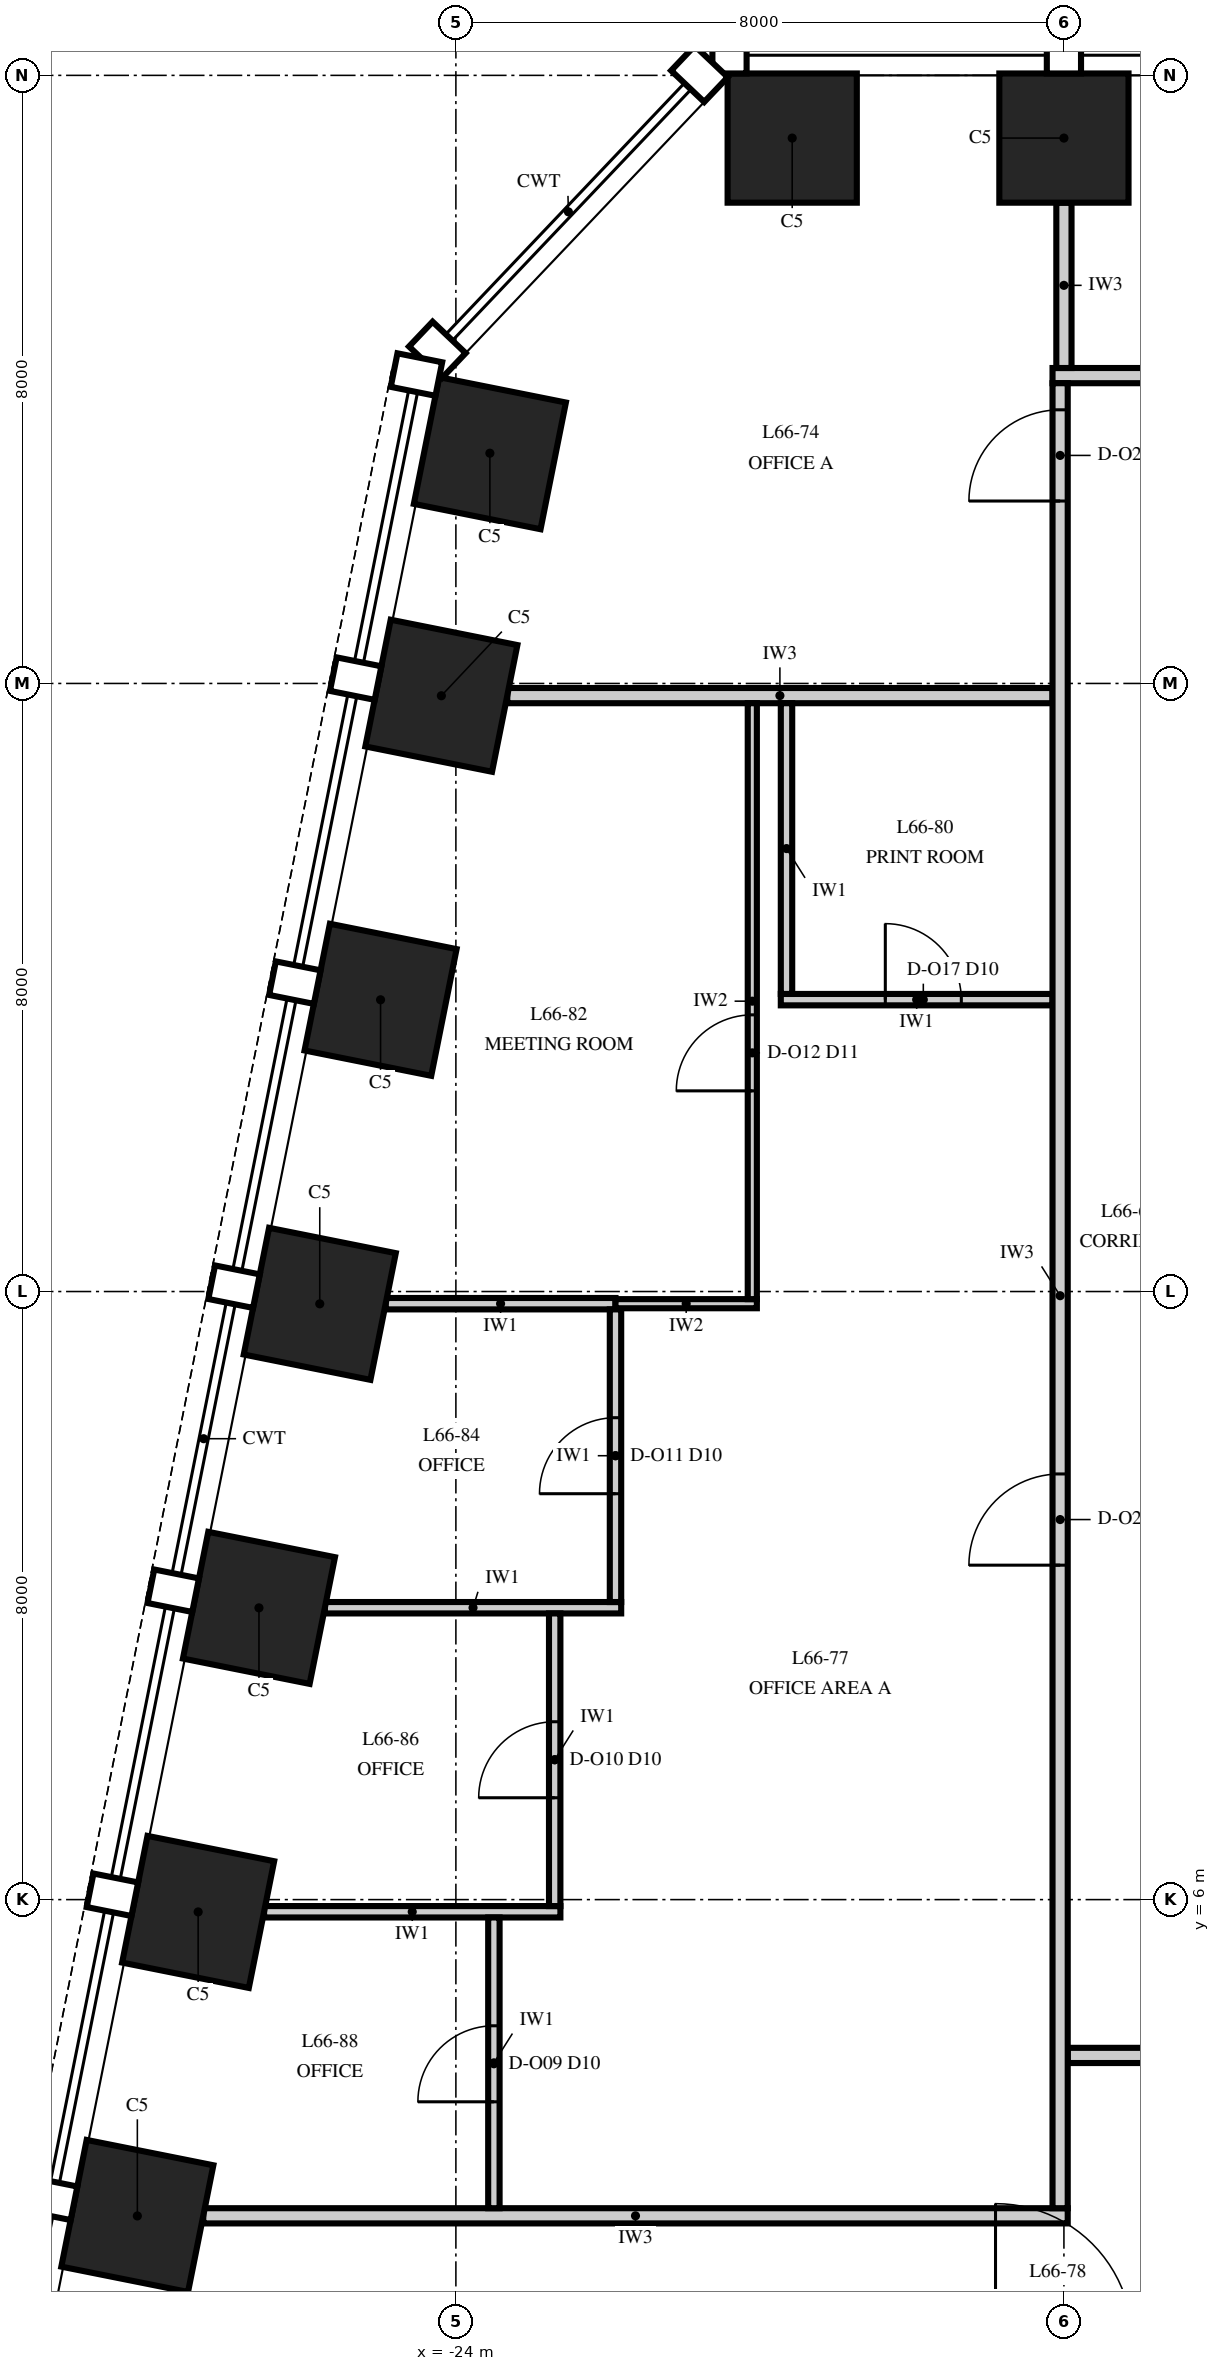
"""IFC4 building model, lengths in metres.
Left out: names, types, materials, properties, quantities, classifications, styles, units other than length and angle.
Written with IfcOpenShell. Run it as: python <this file> out.ifc"""

import sys

from ifc_helpers import new_model, si_unit, direction, frame, frame_2d, origin, origin_2d, place, context, subcontext, project, spatial, rectangle, extrude, element, fill, save


model = new_model("IFC4")
c1 = context("Model", 3, precision=1e-05, world=origin(), true_north=direction((0.0, 1.0)))
c2 = subcontext(c1, "Body", "Model", "MODEL_VIEW")
j1 = project(units=[si_unit("LENGTHUNIT", "METRE"), si_unit("PLANEANGLEUNIT", "RADIAN")], contexts=[c1])
p1 = place(None, origin())
s1 = spatial("IfcSite", under=j1, at=p1, CompositionType="ELEMENT")
p2 = place(p1, origin())
s2 = spatial("IfcBuilding", under=s1, at=p2, CompositionType="ELEMENT")
p3 = place(p2, frame((0.0, 0.0, 284.0)))
s3 = spatial("IfcBuildingStorey", under=s2, at=p3, CompositionType="ELEMENT", Elevation=284.0)
for number, where, z_axis, x_axis in (
    (1, (-16.0, 29.175, 0.0), (0.0, 0.0, 1.0), (-1.0, 0.0, 0.0)),
    (2, (-19.575, 29.175, 0.0), (0.0, 0.0, 1.0), (-1.0, 0.0, 0.0)),
    (3, (-23.553, 25.029, 0.0), (0.0, 0.0, 1.0), (-0.196, -0.981, 0.0)),
    (4, (-24.191, 21.838, 0.0), (0.0, 0.0, 1.0), (-0.196, -0.981, 0.0)),
    (5, (-24.991, 17.838, 0.0), (0.0, 0.0, 1.0), (-0.196, -0.981, 0.0)),
    (6, (-25.791, 13.838, 0.0), (0.0, 0.0, 1.0), (-0.196, -0.981, 0.0)),
    (7, (-26.591, 9.838, 0.0), (0.0, 0.0, 1.0), (-0.196, -0.981, 0.0)),
    (8, (-27.391, 5.838, 0.0), (0.0, 0.0, 1.0), (-0.196, -0.981, 0.0)),
    (9, (-28.191, 1.838, 0.0), (0.0, 0.0, 1.0), (-0.196, -0.981, 0.0)),
):
    element("IfcColumn", number, at=place(p3, frame(where, z_axis=z_axis, x_axis=x_axis)), inside=s3, PredefinedType="COLUMN", context=c2, shape_type="SweptSolid", body=[
        extrude(rectangle(XDim=1.7, YDim=1.7, at=origin_2d()), origin(), (0.0, 0.0, 1.0), 4.0),
    ])
p4 = place(p3, frame((-27.324, 1.84, 0.0), z_axis=(0.0, 0.0, 1.0), x_axis=(1.0, 0.0, 0.0)))
e10 = element("IfcWall", 10, at=p4, inside=s3, PredefinedType="PARTITIONING", context=c2, shape_type="SweptSolid", body=[
    extrude(rectangle(XDim=11.374, YDim=0.2, at=frame_2d((5.687, 0.0))), origin(), (0.0, 0.0, 1.0), 3.23),
])
p5 = place(p3, frame((-15.95, 3.95, 0.0), z_axis=(0.0, 0.0, 1.0), x_axis=(1.0, 0.0, 0.0)))
e11 = element("IfcWall", 11, at=p5, inside=s3, PredefinedType="PARTITIONING", context=c2, shape_type="SweptSolid", body=[
    extrude(rectangle(XDim=14.05, YDim=0.2, at=frame_2d((7.025, 0.0))), origin(), (0.0, 0.0, 1.0), 3.23),
])
p6 = place(p5, frame((9.35, 0.0, 0.0)))
e12 = element("IfcOpeningElement", 12, at=p6, cuts=e11, PredefinedType="OPENING", context=c2, shape_type="SweptSolid", body=[
    extrude(rectangle(XDim=1.2, YDim=2.4, at=frame_2d((0.6, 1.2))), frame((0.0, 0.115, 0.0), z_axis=(0.0, -1.0, 0.0), x_axis=(1.0, 0.0, 0.0)), (0.0, 0.0, 1.0), 0.23),
])
p7 = place(p3, frame((-26.524, 5.84, 0.0), z_axis=(0.0, 0.0, 1.0), x_axis=(1.0, 0.0, 0.0)))
e13 = element("IfcWall", 13, at=p7, inside=s3, PredefinedType="PARTITIONING", context=c2, shape_type="SweptSolid", body=[
    extrude(rectangle(XDim=3.899, YDim=0.15, at=frame_2d((1.949, 0.0))), origin(), (0.0, 0.0, 1.0), 2.842),
])
p8 = place(p3, frame((-25.724, 9.84, 0.0), z_axis=(0.0, 0.0, 1.0), x_axis=(1.0, 0.0, 0.0)))
e14 = element("IfcWall", 14, at=p8, inside=s3, PredefinedType="PARTITIONING", context=c2, shape_type="SweptSolid", body=[
    extrude(rectangle(XDim=3.899, YDim=0.15, at=frame_2d((1.949, 0.0))), origin(), (0.0, 0.0, 1.0), 3.23),
])
p9 = place(p3, frame((-24.924, 13.84, 0.0), z_axis=(0.0, 0.0, 1.0), x_axis=(1.0, 0.0, 0.0)))
e15 = element("IfcWall", 15, at=p9, inside=s3, PredefinedType="PARTITIONING", context=c2, shape_type="SweptSolid", body=[
    extrude(rectangle(XDim=3.024, YDim=0.15, at=frame_2d((1.512, 0.0))), origin(), (0.0, 0.0, 1.0), 3.23),
])
p10 = place(p3, frame((-21.9, 13.84, 0.0), z_axis=(0.0, 0.0, 1.0), x_axis=(1.0, 0.0, 0.0)))
e16 = element("IfcWall", 16, at=p10, inside=s3, PredefinedType="PARTITIONING", context=c2, shape_type="SweptSolid", body=[
    extrude(rectangle(XDim=1.86, YDim=0.12, at=frame_2d((0.93, 0.0))), origin(), (0.0, 0.0, 1.0), 3.85),
])
p11 = place(p3, frame((-19.725, 17.84, 0.0), z_axis=(0.0, 0.0, 1.0), x_axis=(1.0, 0.0, 0.0)))
e17 = element("IfcWall", 17, at=p11, inside=s3, PredefinedType="PARTITIONING", context=c2, shape_type="SweptSolid", body=[
    extrude(rectangle(XDim=3.575, YDim=0.15, at=frame_2d((1.788, 0.0))), origin(), (0.0, 0.0, 1.0), 3.23),
])
p12 = place(p11, frame((1.375, 0.0, 0.0)))
e18 = element("IfcOpeningElement", 18, at=p12, cuts=e17, PredefinedType="OPENING", context=c2, shape_type="SweptSolid", body=[
    extrude(rectangle(XDim=1.0, YDim=2.3, at=frame_2d((0.5, 1.15))), frame((0.0, 0.09, 0.0), z_axis=(0.0, -1.0, 0.0), x_axis=(1.0, 0.0, 0.0)), (0.0, 0.0, 1.0), 0.18),
])
p13 = place(p3, frame((-23.324, 21.84, 0.0), z_axis=(0.0, 0.0, 1.0), x_axis=(1.0, 0.0, 0.0)))
e19 = element("IfcWall", 19, at=p13, inside=s3, PredefinedType="PARTITIONING", context=c2, shape_type="SweptSolid", body=[
    extrude(rectangle(XDim=7.174, YDim=0.2, at=frame_2d((3.587, 0.0))), origin(), (0.0, 0.0, 1.0), 3.23),
])
p14 = place(p3, frame((-16.15, 26.05, 0.0), z_axis=(0.0, 0.0, 1.0), x_axis=(1.0, 0.0, 0.0)))
e20 = element("IfcWall", 20, at=p14, inside=s3, PredefinedType="PARTITIONING", context=c2, shape_type="SweptSolid", body=[
    extrude(rectangle(XDim=32.3, YDim=0.2, at=frame_2d((16.15, 0.0))), origin(), (0.0, 0.0, 1.0), 3.418),
])
p15 = place(p14, frame((1.55, 0.0, 0.0)))
e21 = element("IfcOpeningElement", 21, at=p15, cuts=e20, PredefinedType="OPENING", context=c2, shape_type="SweptSolid", body=[
    extrude(rectangle(XDim=1.2, YDim=2.4, at=frame_2d((0.6, 1.2))), frame((0.0, 0.115, 0.0), z_axis=(0.0, -1.0, 0.0), x_axis=(1.0, 0.0, 0.0)), (0.0, 0.0, 1.0), 0.23),
])
p16 = place(p14, frame((7.55, 0.0, 0.0)))
e22 = element("IfcOpeningElement", 22, at=p16, cuts=e20, PredefinedType="OPENING", context=c2, shape_type="SweptSolid", body=[
    extrude(rectangle(XDim=1.2, YDim=2.4, at=frame_2d((0.6, 1.2))), frame((0.0, 0.115, 0.0), z_axis=(0.0, -1.0, 0.0), x_axis=(1.0, 0.0, 0.0)), (0.0, 0.0, 1.0), 0.23),
])
p17 = place(p14, frame((13.55, 0.0, 0.0)))
e23 = element("IfcOpeningElement", 23, at=p17, cuts=e20, PredefinedType="OPENING", context=c2, shape_type="SweptSolid", body=[
    extrude(rectangle(XDim=1.2, YDim=2.4, at=frame_2d((0.6, 1.2))), frame((0.0, 0.115, 0.0), z_axis=(0.0, -1.0, 0.0), x_axis=(1.0, 0.0, 0.0)), (0.0, 0.0, 1.0), 0.23),
])
p18 = place(p14, frame((17.55, 0.0, 0.0)))
e24 = element("IfcOpeningElement", 24, at=p18, cuts=e20, PredefinedType="OPENING", context=c2, shape_type="SweptSolid", body=[
    extrude(rectangle(XDim=1.2, YDim=2.4, at=frame_2d((0.6, 1.2))), frame((0.0, 0.115, 0.0), z_axis=(0.0, -1.0, 0.0), x_axis=(1.0, 0.0, 0.0)), (0.0, 0.0, 1.0), 0.23),
])
p19 = place(p14, frame((23.55, 0.0, 0.0)))
e25 = element("IfcOpeningElement", 25, at=p19, cuts=e20, PredefinedType="OPENING", context=c2, shape_type="SweptSolid", body=[
    extrude(rectangle(XDim=1.2, YDim=2.4, at=frame_2d((0.6, 1.2))), frame((0.0, 0.115, 0.0), z_axis=(0.0, -1.0, 0.0), x_axis=(1.0, 0.0, 0.0)), (0.0, 0.0, 1.0), 0.23),
])
p20 = place(p14, frame((29.55, 0.0, 0.0)))
e26 = element("IfcOpeningElement", 26, at=p20, cuts=e20, PredefinedType="OPENING", context=c2, shape_type="SweptSolid", body=[
    extrude(rectangle(XDim=1.2, YDim=2.4, at=frame_2d((0.6, 1.2))), frame((0.0, 0.115, 0.0), z_axis=(0.0, -1.0, 0.0), x_axis=(1.0, 0.0, 0.0)), (0.0, 0.0, 1.0), 0.23),
])
p21 = place(p3, frame((-23.5, 1.94, 0.0), z_axis=(0.0, 0.0, 1.0), x_axis=(0.0, 1.0, 0.0)))
e27 = element("IfcWall", 27, at=p21, inside=s3, PredefinedType="PARTITIONING", context=c2, shape_type="SweptSolid", body=[
    extrude(rectangle(XDim=3.825, YDim=0.15, at=frame_2d((1.913, 0.0))), origin(), (0.0, 0.0, 1.0), 3.85),
])
p22 = place(p21, frame((1.4, 0.0, 0.0)))
e28 = element("IfcOpeningElement", 28, at=p22, cuts=e27, PredefinedType="OPENING", context=c2, shape_type="SweptSolid", body=[
    extrude(rectangle(XDim=1.0, YDim=2.3, at=frame_2d((0.5, 1.15))), frame((0.0, 0.09, 0.0), z_axis=(0.0, -1.0, 0.0), x_axis=(1.0, 0.0, 0.0)), (0.0, 0.0, 1.0), 0.18),
])
p23 = place(p3, frame((-22.7, 5.915, 0.0), z_axis=(0.0, 0.0, 1.0), x_axis=(0.0, 1.0, 0.0)))
e29 = element("IfcWall", 29, at=p23, inside=s3, PredefinedType="PARTITIONING", context=c2, shape_type="SweptSolid", body=[
    extrude(rectangle(XDim=3.85, YDim=0.15, at=frame_2d((1.925, 0.0))), origin(), (0.0, 0.0, 1.0), 2.842),
])
p24 = place(p23, frame((1.425, 0.0, 0.0)))
e30 = element("IfcOpeningElement", 30, at=p24, cuts=e29, PredefinedType="OPENING", context=c2, shape_type="SweptSolid", body=[
    extrude(rectangle(XDim=1.0, YDim=2.3, at=frame_2d((0.5, 1.15))), frame((0.0, 0.09, 0.0), z_axis=(0.0, -1.0, 0.0), x_axis=(1.0, 0.0, 0.0)), (0.0, 0.0, 1.0), 0.18),
])
p25 = place(p3, frame((-21.9, 9.915, 0.0), z_axis=(0.0, 0.0, 1.0), x_axis=(0.0, 1.0, 0.0)))
e31 = element("IfcWall", 31, at=p25, inside=s3, PredefinedType="PARTITIONING", context=c2, shape_type="SweptSolid", body=[
    extrude(rectangle(XDim=3.85, YDim=0.15, at=frame_2d((1.925, 0.0))), origin(), (0.0, 0.0, 1.0), 3.85),
])
p26 = place(p25, frame((1.425, 0.0, 0.0)))
e32 = element("IfcOpeningElement", 32, at=p26, cuts=e31, PredefinedType="OPENING", context=c2, shape_type="SweptSolid", body=[
    extrude(rectangle(XDim=1.0, YDim=2.3, at=frame_2d((0.5, 1.15))), frame((0.0, 0.09, 0.0), z_axis=(0.0, -1.0, 0.0), x_axis=(1.0, 0.0, 0.0)), (0.0, 0.0, 1.0), 0.18),
])
p27 = place(p3, frame((-20.1, 13.9, 0.0), z_axis=(0.0, 0.0, 1.0), x_axis=(0.0, 1.0, 0.0)))
e33 = element("IfcWall", 33, at=p27, inside=s3, PredefinedType="PARTITIONING", context=c2, shape_type="SweptSolid", body=[
    extrude(rectangle(XDim=7.84, YDim=0.12, at=frame_2d((3.92, 0.0))), origin(), (0.0, 0.0, 1.0), 3.23),
])
p28 = place(p27, frame((2.74, 0.0, 0.0)))
e34 = element("IfcOpeningElement", 34, at=p28, cuts=e33, PredefinedType="OPENING", context=c2, shape_type="SweptSolid", body=[
    extrude(rectangle(XDim=1.0, YDim=2.4, at=frame_2d((0.5, 1.2))), frame((0.0, 0.075, 0.0), z_axis=(0.0, -1.0, 0.0), x_axis=(1.0, 0.0, 0.0)), (0.0, 0.0, 1.0), 0.15),
])
p29 = place(p3, frame((-19.65, 17.915, 0.0), z_axis=(0.0, 0.0, 1.0), x_axis=(0.0, 1.0, 0.0)))
e35 = element("IfcWall", 35, at=p29, inside=s3, PredefinedType="PARTITIONING", context=c2, shape_type="SweptSolid", body=[
    extrude(rectangle(XDim=3.825, YDim=0.15, at=frame_2d((1.913, 0.0))), origin(), (0.0, 0.0, 1.0), 3.23),
])
p30 = place(p3, frame((-16.05, 1.94, 0.0), z_axis=(0.0, 0.0, 1.0), x_axis=(0.0, 1.0, 0.0)))
e36 = element("IfcWall", 36, at=p30, inside=s3, PredefinedType="PARTITIONING", context=c2, shape_type="SweptSolid", body=[
    extrude(rectangle(XDim=24.01, YDim=0.2, at=frame_2d((12.005, 0.0))), origin(), (0.0, 0.0, 1.0), 2.842),
])
p31 = place(p30, frame((8.46, 0.0, 0.0)))
e37 = element("IfcOpeningElement", 37, at=p31, cuts=e36, PredefinedType="OPENING", context=c2, shape_type="SweptSolid", body=[
    extrude(rectangle(XDim=1.2, YDim=2.4, at=frame_2d((0.6, 1.2))), frame((0.0, 0.115, 0.0), z_axis=(0.0, -1.0, 0.0), x_axis=(1.0, 0.0, 0.0)), (0.0, 0.0, 1.0), 0.23),
])
p32 = place(p30, frame((22.46, 0.0, 0.0)))
e38 = element("IfcOpeningElement", 38, at=p32, cuts=e36, PredefinedType="OPENING", context=c2, shape_type="SweptSolid", body=[
    extrude(rectangle(XDim=1.2, YDim=2.4, at=frame_2d((0.6, 1.2))), frame((0.0, 0.115, 0.0), z_axis=(0.0, -1.0, 0.0), x_axis=(1.0, 0.0, 0.0)), (0.0, 0.0, 1.0), 0.23),
])
p33 = place(p3, frame((-16.0, 26.15, 0.0), z_axis=(0.0, 0.0, 1.0), x_axis=(0.0, 1.0, 0.0)))
e39 = element("IfcWall", 39, at=p33, inside=s3, PredefinedType="PARTITIONING", context=c2, shape_type="SweptSolid", body=[
    extrude(rectangle(XDim=2.175, YDim=0.2, at=frame_2d((1.087, 0.0))), origin(), (0.0, 0.0, 1.0), 3.418),
])
p34 = place(p22, origin())
e40 = element("IfcDoor", 40, at=p34, inside=s3, OperationType="SINGLE_SWING_LEFT", PredefinedType="DOOR", context=c2, shape_type="SweptSolid", body=[
    extrude(rectangle(XDim=1.0, YDim=2.3, at=frame_2d((0.5, 1.15))), frame((0.0, 0.075, 0.0), z_axis=(0.0, -1.0, 0.0), x_axis=(1.0, 0.0, 0.0)), (0.0, 0.0, 1.0), 0.149),
])
fill(e28, e40)
p35 = place(p24, origin())
e41 = element("IfcDoor", 41, at=p35, inside=s3, OperationType="SINGLE_SWING_LEFT", PredefinedType="DOOR", context=c2, shape_type="SweptSolid", body=[
    extrude(rectangle(XDim=1.0, YDim=2.3, at=frame_2d((0.5, 1.15))), frame((0.0, 0.075, 0.0), z_axis=(0.0, -1.0, 0.0), x_axis=(1.0, 0.0, 0.0)), (0.0, 0.0, 1.0), 0.149),
])
fill(e30, e41)
p36 = place(p26, origin())
e42 = element("IfcDoor", 42, at=p36, inside=s3, OperationType="SINGLE_SWING_LEFT", PredefinedType="DOOR", context=c2, shape_type="SweptSolid", body=[
    extrude(rectangle(XDim=1.0, YDim=2.3, at=frame_2d((0.5, 1.15))), frame((0.0, 0.075, 0.0), z_axis=(0.0, -1.0, 0.0), x_axis=(1.0, 0.0, 0.0)), (0.0, 0.0, 1.0), 0.149),
])
fill(e32, e42)
p37 = place(p28, origin())
e43 = element("IfcDoor", 43, at=p37, inside=s3, OperationType="SINGLE_SWING_RIGHT", PredefinedType="DOOR", context=c2, shape_type="SweptSolid", body=[
    extrude(rectangle(XDim=1.0, YDim=2.4, at=frame_2d((0.5, 1.2))), frame((0.0, 0.06, 0.0), z_axis=(0.0, -1.0, 0.0), x_axis=(1.0, 0.0, 0.0)), (0.0, 0.0, 1.0), 0.12),
])
fill(e34, e43)
p38 = place(p12, origin())
e44 = element("IfcDoor", 44, at=p38, inside=s3, OperationType="SINGLE_SWING_LEFT", PredefinedType="DOOR", context=c2, shape_type="SweptSolid", body=[
    extrude(rectangle(XDim=1.0, YDim=2.3, at=frame_2d((0.5, 1.15))), frame((0.0, 0.075, 0.0), z_axis=(0.0, -1.0, 0.0), x_axis=(1.0, 0.0, 0.0)), (0.0, 0.0, 1.0), 0.149),
])
fill(e18, e44)
p39 = place(p31, origin())
e45 = element("IfcDoor", 45, at=p39, inside=s3, OperationType="SINGLE_SWING_LEFT", PredefinedType="DOOR", context=c2, shape_type="SweptSolid", body=[
    extrude(rectangle(XDim=1.2, YDim=2.4, at=frame_2d((0.6, 1.2))), frame((0.0, 0.1, 0.0), z_axis=(0.0, -1.0, 0.0), x_axis=(1.0, 0.0, 0.0)), (0.0, 0.0, 1.0), 0.199),
])
fill(e37, e45)
p40 = place(p32, origin())
e46 = element("IfcDoor", 46, at=p40, inside=s3, OperationType="SINGLE_SWING_LEFT", PredefinedType="DOOR", context=c2, shape_type="SweptSolid", body=[
    extrude(rectangle(XDim=1.2, YDim=2.4, at=frame_2d((0.6, 1.2))), frame((0.0, 0.1, 0.0), z_axis=(0.0, -1.0, 0.0), x_axis=(1.0, 0.0, 0.0)), (0.0, 0.0, 1.0), 0.199),
])
fill(e38, e46)
save(model, sys.argv[1])
